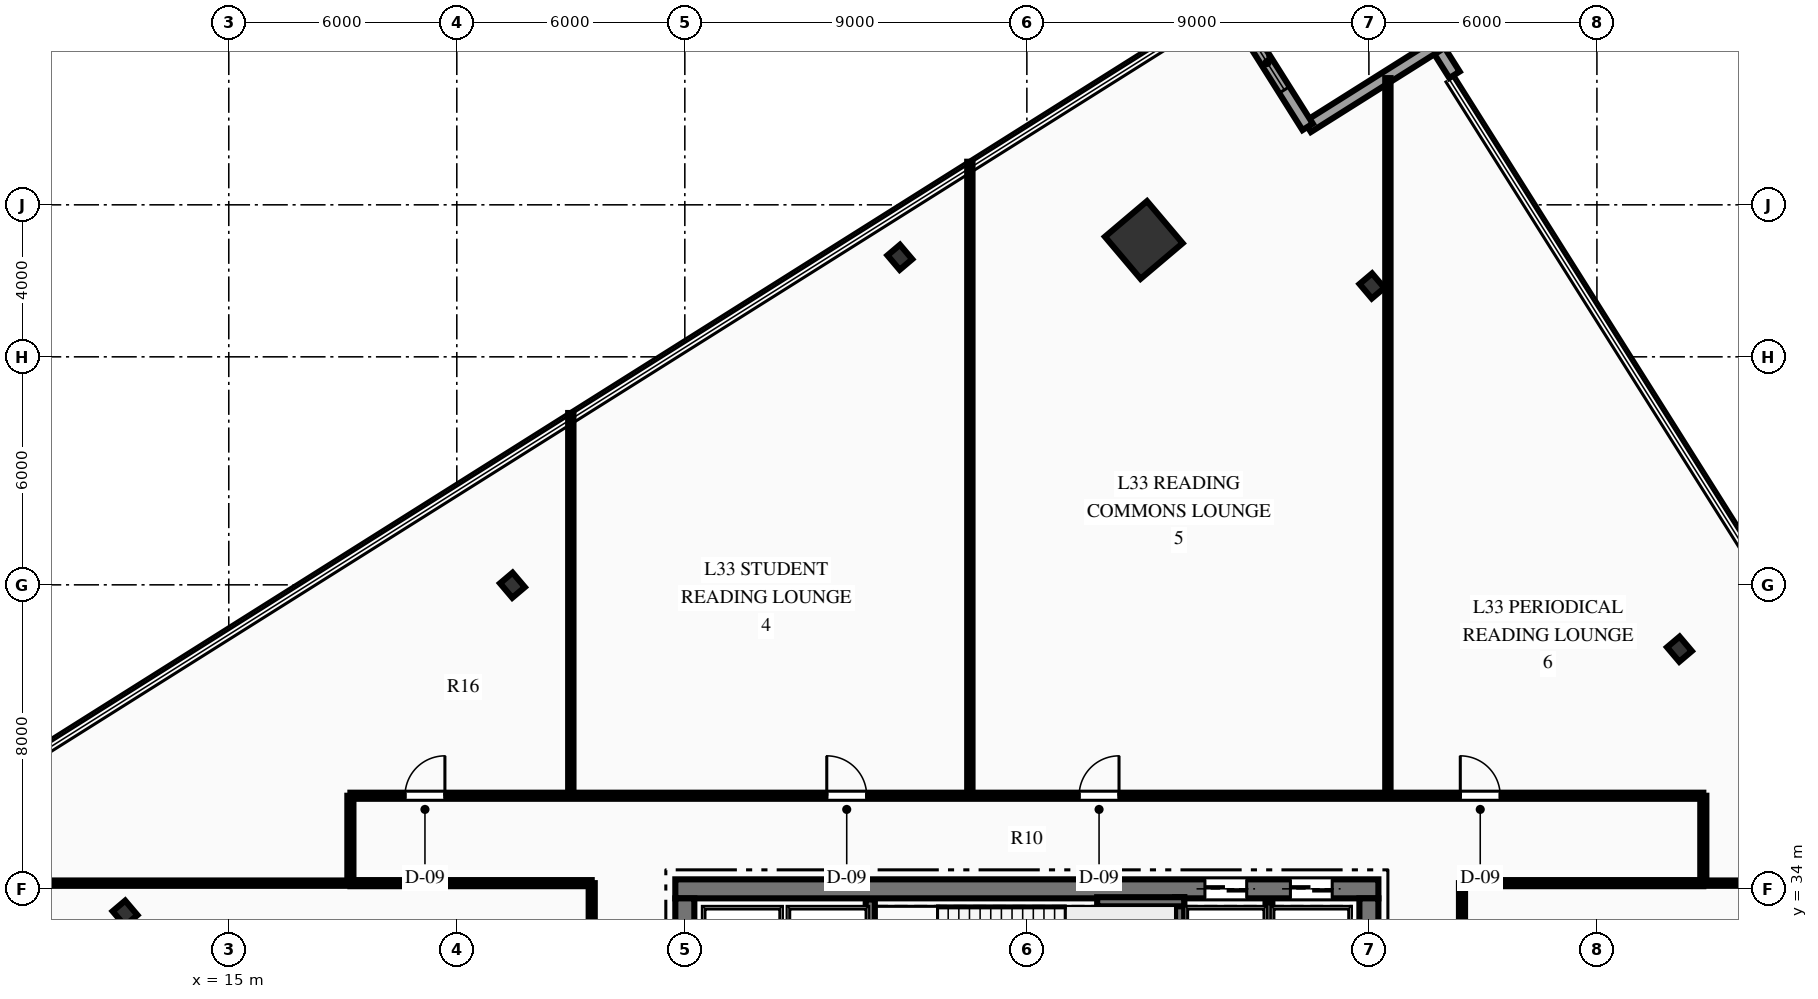
"""IFC4 building model, lengths in metres.
Left out: names, types, materials, properties, quantities, classifications, styles, units other than length and angle.
Written with IfcOpenShell. Run it as: python <this file> out.ifc"""

import sys

from ifc_helpers import new_model, si_unit, direction, frame, frame_2d, origin, origin_2d, place, context, subcontext, project, spatial, rectangle, hollow_rectangle, i_section, extrude, element, fill, save


model = new_model("IFC4")
c1 = context("Model", 3, precision=1e-05, world=origin(), true_north=direction((0.0, 1.0)))
c2 = subcontext(c1, "Body", "Model", "MODEL_VIEW")
j1 = project(units=[si_unit("LENGTHUNIT", "METRE"), si_unit("PLANEANGLEUNIT", "RADIAN")], contexts=[c1])
p1 = place(None, origin())
s1 = spatial("IfcSite", under=j1, at=p1, CompositionType="ELEMENT")
p2 = place(p1, origin())
s2 = spatial("IfcBuilding", under=s1, at=p2, CompositionType="ELEMENT")
p3 = place(p2, frame((0.0, 0.0, 136.2)))
s3 = spatial("IfcBuildingStorey", under=s2, at=p3, CompositionType="ELEMENT", Elevation=136.2)
p4 = place(p3, frame((26.75, 34.0, 0.0), z_axis=(0.0, 0.0, 1.0), x_axis=(1.0, 0.0, 0.0)))
e1 = element("IfcWall", 1, at=p4, inside=s3, PredefinedType="SHEAR", context=c2, shape_type="SweptSolid", body=[
    extrude(rectangle(XDim=18.5, YDim=0.5, at=frame_2d((9.25, 0.0))), origin(), (0.0, 0.0, 1.0), 4.5),
])
p5 = place(p4, frame((13.935, 0.0, 0.0)))
e2 = element("IfcOpeningElement", 2, at=p5, cuts=e1, PredefinedType="OPENING", context=c2, shape_type="SweptSolid", body=[
    extrude(rectangle(XDim=1.1, YDim=2.15, at=frame_2d((0.55, 1.075))), frame((0.0, 0.26, 0.0), z_axis=(0.0, -1.0, 0.0), x_axis=(1.0, 0.0, 0.0)), (0.0, 0.0, 1.0), 0.52),
])
p6 = place(p4, frame((16.185, 0.0, 0.0)))
e3 = element("IfcOpeningElement", 3, at=p6, cuts=e1, PredefinedType="OPENING", context=c2, shape_type="SweptSolid", body=[
    extrude(rectangle(XDim=1.1, YDim=2.15, at=frame_2d((0.55, 1.075))), frame((0.0, 0.26, 0.0), z_axis=(0.0, -1.0, 0.0), x_axis=(1.0, 0.0, 0.0)), (0.0, 0.0, 1.0), 0.52),
])
p7 = place(p3, frame((27.0, 18.25, 0.0), z_axis=(0.0, 0.0, 1.0), x_axis=(0.0, 1.0, 0.0)))
e4 = element("IfcWall", 4, at=p7, inside=s3, PredefinedType="SHEAR", context=c2, shape_type="SweptSolid", body=[
    extrude(rectangle(XDim=15.5, YDim=0.5, at=frame_2d((7.75, 0.0))), origin(), (0.0, 0.0, 1.0), 4.5),
])
p8 = place(p7, frame((9.99, 0.0, 0.0)))
e5 = element("IfcOpeningElement", 5, at=p8, cuts=e4, PredefinedType="OPENING", context=c2, shape_type="SweptSolid", body=[
    extrude(rectangle(XDim=1.4, YDim=2.2, at=frame_2d((0.7, 1.1))), frame((0.0, 0.26, 0.0), z_axis=(0.0, -1.0, 0.0), x_axis=(1.0, 0.0, 0.0)), (0.0, 0.0, 1.0), 0.52),
])
p9 = place(p3, frame((45.0, 18.25, 0.0), z_axis=(0.0, 0.0, 1.0), x_axis=(0.0, 1.0, 0.0)))
e6 = element("IfcWall", 6, at=p9, inside=s3, PredefinedType="SHEAR", context=c2, shape_type="SweptSolid", body=[
    extrude(rectangle(XDim=15.5, YDim=0.5, at=frame_2d((7.75, 0.0))), origin(), (0.0, 0.0, 1.0), 4.5),
])
p10 = place(p9, frame((9.99, 0.0, 0.0)))
e7 = element("IfcOpeningElement", 7, at=p10, cuts=e6, PredefinedType="OPENING", context=c2, shape_type="SweptSolid", body=[
    extrude(rectangle(XDim=1.4, YDim=2.2, at=frame_2d((0.7, 1.1))), frame((0.0, 0.26, 0.0), z_axis=(0.0, -1.0, 0.0), x_axis=(1.0, 0.0, 0.0)), (0.0, 0.0, 1.0), 0.52),
])
p11 = place(p3, frame((31.88, 29.93, 0.0), z_axis=(0.0, 0.0, 1.0), x_axis=(0.0, 1.0, 0.0)))
e8 = element("IfcWall", 8, at=p11, inside=s3, PredefinedType="SHEAR", context=c2, shape_type="SweptSolid", body=[
    extrude(rectangle(XDim=3.79, YDim=0.24, at=frame_2d((1.895, 0.0))), origin(), (0.0, 0.0, 1.0), 4.5),
])
p12 = place(p3, frame((40.02, 29.93, 0.0), z_axis=(0.0, 0.0, 1.0), x_axis=(0.0, 1.0, 0.0)))
e9 = element("IfcWall", 9, at=p12, inside=s3, PredefinedType="SHEAR", context=c2, shape_type="SweptSolid", body=[
    extrude(rectangle(XDim=3.85, YDim=0.24, at=frame_2d((1.925, 0.0))), origin(), (0.0, 0.0, 1.0), 4.5),
])
p13 = place(p3, frame((37.85, 33.66, 0.0), z_axis=(0.0, 0.0, 1.0), x_axis=(1.0, 0.0, 0.0)))
e10 = element("IfcWall", 10, at=p13, inside=s3, PredefinedType="SHEAR", context=c2, shape_type="SweptSolid", body=[
    extrude(rectangle(XDim=2.29, YDim=0.24, at=frame_2d((1.145, 0.0))), origin(), (0.0, 0.0, 1.0), 4.5),
])
p14 = place(p3, frame((39.077, 51.075, 0.0), z_axis=(0.0, 0.0, 1.0), x_axis=(0.763232469783, 0.646123979643, 0.0)))
e11 = element("IfcColumn", 11, at=p14, inside=s3, PredefinedType="COLUMN", context=c2, shape_type="SweptSolid", body=[
    extrude(hollow_rectangle(XDim=1.45, YDim=1.45, WallThickness=0.07, at=origin_2d()), origin(), (0.0, 0.0, 1.0), 4.5),
])
for number, where, z_axis, x_axis in (
    (12, (53.171, 40.307, 0.0), (0.0, 0.0, 1.0), (0.763, 0.646, 0.0)),
    (13, (45.08, 49.865, 0.0), (0.0, 0.0, 1.0), (0.763, 0.646, 0.0)),
    (14, (32.657, 50.619, 0.0), (0.0, 0.0, 1.0), (0.763, 0.646, 0.0)),
    (15, (22.464, 41.99, 0.0), (0.0, 0.0, 1.0), (0.763, 0.646, 0.0)),
    (16, (12.27, 33.36, 0.0), (0.0, 0.0, 1.0), (0.763, 0.646, 0.0)),
):
    element("IfcColumn", number, at=place(p3, frame(where, z_axis=z_axis, x_axis=x_axis)), inside=s3, PredefinedType="COLUMN", context=c2, shape_type="SweptSolid", body=[
        extrude(i_section(OverallWidth=0.432, OverallDepth=0.498, WebThickness=0.056, FlangeThickness=0.089, at=origin_2d()), origin(), (0.0, 0.0, 1.0), 4.5),
    ])
p15 = place(p3, frame((46.773, 56.183, 0.0), z_axis=(0.0, 0.0, 1.0), x_axis=(0.532726937179, -0.846287191445, 0.0)))
e17 = element("IfcWall", 17, at=p15, inside=s3, PredefinedType="STANDARD", context=c2, shape_type="SweptSolid", body=[
    extrude(rectangle(XDim=0.9, YDim=0.32, at=frame_2d((0.45, 0.0))), origin(), (0.0, 0.0, 1.0), 4.21),
])
p16 = place(p3, frame((43.388, 54.052, 0.0), z_axis=(0.0, 0.0, 1.0), x_axis=(0.846200224481, 0.532865067432, 0.0)))
e18 = element("IfcWall", 18, at=p16, inside=s3, PredefinedType="STANDARD", context=c2, shape_type="SweptSolid", body=[
    extrude(rectangle(XDim=4.0, YDim=0.32, at=frame_2d((2.0, 0.0))), origin(), (0.0, 0.0, 1.0), 4.21),
])
p17 = place(p3, frame((41.257, 57.436, 0.0), z_axis=(0.0, 0.0, 1.0), x_axis=(0.532848883848, -0.846210415312, 0.0)))
e19 = element("IfcWall", 19, at=p17, inside=s3, PredefinedType="STANDARD", context=c2, shape_type="SweptSolid", body=[
    extrude(rectangle(XDim=4.0, YDim=0.32, at=frame_2d((2.0, 0.0))), origin(), (0.0, 0.0, 1.0), 4.21),
])
p18 = place(p17, frame((1.15, 0.0, 0.75)))
e20 = element("IfcOpeningElement", 20, at=p18, cuts=e19, PredefinedType="OPENING", context=c2, shape_type="SweptSolid", body=[
    extrude(rectangle(XDim=1.7, YDim=2.5, at=frame_2d((0.85, 1.25))), frame((0.0, 0.17, 0.0), z_axis=(0.0, -1.0, 0.0), x_axis=(1.0, 0.0, 0.0)), (0.0, 0.0, 1.0), 0.34),
])
p19 = place(p3, frame((42.37, 29.9, 0.0), z_axis=(0.0, 0.0, 1.0), x_axis=(0.0, 1.0, 0.0)))
e21 = element("IfcWall", 21, at=p19, inside=s3, PredefinedType="PARTITIONING", context=c2, shape_type="SweptSolid", body=[
    extrude(rectangle(XDim=3.75, YDim=0.18, at=frame_2d((1.875, 0.0))), origin(), (0.0, 0.0, 1.0), 4.21),
])
p20 = place(p3, frame((18.2, 36.45, 0.0), z_axis=(0.0, 0.0, 1.0), x_axis=(1.0, 0.0, 0.0)))
e22 = element("IfcWall", 22, at=p20, inside=s3, PredefinedType="PARTITIONING", context=c2, shape_type="SweptSolid", body=[
    extrude(rectangle(XDim=35.6, YDim=0.16, at=frame_2d((17.8, 0.0))), origin(), (0.0, 0.0, 1.0), 4.21),
])
p21 = place(p20, frame((1.437, 0.0, 0.0)))
e23 = element("IfcOpeningElement", 23, at=p21, cuts=e22, PredefinedType="OPENING", context=c2, shape_type="SweptSolid", body=[
    extrude(rectangle(XDim=1.05, YDim=2.15, at=frame_2d((0.525, 1.075))), frame((0.0, 0.09, 0.0), z_axis=(0.0, -1.0, 0.0), x_axis=(1.0, 0.0, 0.0)), (0.0, 0.0, 1.0), 0.18),
])
p22 = place(p20, frame((12.535, 0.0, 0.0)))
e24 = element("IfcOpeningElement", 24, at=p22, cuts=e22, PredefinedType="OPENING", context=c2, shape_type="SweptSolid", body=[
    extrude(rectangle(XDim=1.05, YDim=2.15, at=frame_2d((0.525, 1.075))), frame((0.0, 0.09, 0.0), z_axis=(0.0, -1.0, 0.0), x_axis=(1.0, 0.0, 0.0)), (0.0, 0.0, 1.0), 0.18),
])
p23 = place(p20, frame((19.175, 0.0, 0.0)))
e25 = element("IfcOpeningElement", 25, at=p23, cuts=e22, PredefinedType="OPENING", context=c2, shape_type="SweptSolid", body=[
    extrude(rectangle(XDim=1.05, YDim=2.15, at=frame_2d((0.525, 1.075))), frame((0.0, 0.09, 0.0), z_axis=(0.0, -1.0, 0.0), x_axis=(1.0, 0.0, 0.0)), (0.0, 0.0, 1.0), 0.18),
])
p24 = place(p20, frame((29.205, 0.0, 0.0)))
e26 = element("IfcOpeningElement", 26, at=p24, cuts=e22, PredefinedType="OPENING", context=c2, shape_type="SweptSolid", body=[
    extrude(rectangle(XDim=1.05, YDim=2.15, at=frame_2d((0.525, 1.075))), frame((0.0, 0.09, 0.0), z_axis=(0.0, -1.0, 0.0), x_axis=(1.0, 0.0, 0.0)), (0.0, 0.0, 1.0), 0.18),
])
for number, where, z_axis, x_axis in (
    (27, (18.2, 34.15, 0.0), (0.0, 0.0, 1.0), (1.0, 0.0, 0.0)),
    (28, (47.45, 34.15, 0.0), (0.0, 0.0, 1.0), (1.0, 0.0, 0.0)),
):
    element("IfcWall", number, at=place(p3, frame(where, z_axis=z_axis, x_axis=x_axis)), inside=s3, PredefinedType="PARTITIONING", context=c2, shape_type="SweptSolid", body=[
        extrude(rectangle(XDim=6.35, YDim=0.16, at=frame_2d((3.175, 0.0))), origin(), (0.0, 0.0, 1.0), 4.21),
    ])
p25 = place(p3, frame((24.55, 17.85, 0.0), z_axis=(0.0, 0.0, 1.0), x_axis=(0.0, 1.0, 0.0)))
e29 = element("IfcWall", 29, at=p25, inside=s3, PredefinedType="PARTITIONING", context=c2, shape_type="SweptSolid", body=[
    extrude(rectangle(XDim=16.3, YDim=0.16, at=frame_2d((8.15, 0.0))), origin(), (0.0, 0.0, 1.0), 4.21),
])
p26 = place(p25, frame((7.967, 0.0, 0.0)))
e30 = element("IfcOpeningElement", 30, at=p26, cuts=e29, PredefinedType="OPENING", context=c2, shape_type="SweptSolid", body=[
    extrude(rectangle(XDim=1.05, YDim=2.15, at=frame_2d((0.525, 1.075))), frame((0.0, 0.09, 0.0), z_axis=(0.0, -1.0, 0.0), x_axis=(1.0, 0.0, 0.0)), (0.0, 0.0, 1.0), 0.18),
])
p27 = place(p3, frame((47.45, 27.25, 0.0), z_axis=(0.0, 0.0, 1.0), x_axis=(0.0, 1.0, 0.0)))
e31 = element("IfcWall", 31, at=p27, inside=s3, PredefinedType="PARTITIONING", context=c2, shape_type="SweptSolid", body=[
    extrude(rectangle(XDim=6.9, YDim=0.16, at=frame_2d((3.45, 0.0))), origin(), (0.0, 0.0, 1.0), 4.21),
])
p28 = place(p27, frame((1.683, 0.0, 0.0)))
e32 = element("IfcOpeningElement", 32, at=p28, cuts=e31, PredefinedType="OPENING", context=c2, shape_type="SweptSolid", body=[
    extrude(rectangle(XDim=1.05, YDim=2.15, at=frame_2d((0.525, 1.075))), frame((0.0, 0.09, 0.0), z_axis=(0.0, -1.0, 0.0), x_axis=(1.0, 0.0, 0.0)), (0.0, 0.0, 1.0), 0.18),
])
for number, where, z_axis, x_axis in (
    (33, (18.2, 34.15, 0.0), (0.0, 0.0, 1.0), (0.0, 1.0, 0.0)),
    (34, (53.8, 34.15, 0.0), (0.0, 0.0, 1.0), (0.0, 1.0, 0.0)),
):
    element("IfcWall", number, at=place(p3, frame(where, z_axis=z_axis, x_axis=x_axis)), inside=s3, PredefinedType="PARTITIONING", context=c2, shape_type="SweptSolid", body=[
        extrude(rectangle(XDim=2.3, YDim=0.16, at=frame_2d((1.15, 0.0))), origin(), (0.0, 0.0, 1.0), 4.21),
    ])
p29 = place(p3, frame((5.862, 34.15, 0.0), z_axis=(0.0, 0.0, 1.0), x_axis=(1.0, 0.0, 0.0)))
e35 = element("IfcWall", 35, at=p29, inside=s3, PredefinedType="PARTITIONING", context=c2, shape_type="SweptSolid", body=[
    extrude(rectangle(XDim=12.338, YDim=0.14, at=frame_2d((6.169, 0.0))), origin(), (0.0, 0.0, 1.0), 4.21),
])
p30 = place(p3, frame((53.8, 34.15, 0.0), z_axis=(0.0, 0.0, 1.0), x_axis=(1.0, 0.0, 0.0)))
e36 = element("IfcWall", 36, at=p30, inside=s3, PredefinedType="PARTITIONING", context=c2, shape_type="SweptSolid", body=[
    extrude(rectangle(XDim=6.801, YDim=0.14, at=frame_2d((3.4, 0.0))), origin(), (0.0, 0.0, 1.0), 4.21),
])
p31 = place(p3, frame((24.0, 36.45, 0.0), z_axis=(0.0, 0.0, 1.0), x_axis=(0.0, 1.0, 0.0)))
e37 = element("IfcWall", 37, at=p31, inside=s3, PredefinedType="PARTITIONING", context=c2, shape_type="SweptSolid", body=[
    extrude(rectangle(XDim=10.072, YDim=0.14, at=frame_2d((5.036, 0.0))), origin(), (0.0, 0.0, 1.0), 4.21),
])
p32 = place(p3, frame((34.5, 36.45, 0.0), z_axis=(0.0, 0.0, 1.0), x_axis=(0.0, 1.0, 0.0)))
e38 = element("IfcWall", 38, at=p32, inside=s3, PredefinedType="PARTITIONING", context=c2, shape_type="SweptSolid", body=[
    extrude(rectangle(XDim=16.684, YDim=0.14, at=frame_2d((8.342, 0.0))), origin(), (0.0, 0.0, 1.0), 4.21),
])
p33 = place(p3, frame((45.5, 36.45, 0.0), z_axis=(0.0, 0.0, 1.0), x_axis=(0.0, 1.0, 0.0)))
e39 = element("IfcWall", 39, at=p33, inside=s3, PredefinedType="PARTITIONING", context=c2, shape_type="SweptSolid", body=[
    extrude(rectangle(XDim=18.884, YDim=0.14, at=frame_2d((9.442, 0.0))), origin(), (0.0, 0.0, 1.0), 4.21),
])
p34 = place(p18, origin())
e40 = element("IfcWindow", 40, at=p34, inside=s3, PartitioningType="SINGLE_PANEL", PredefinedType="WINDOW", context=c2, shape_type="SweptSolid", body=[
    extrude(rectangle(XDim=1.7, YDim=2.5, at=frame_2d((0.85, 1.25))), frame((0.0, 0.03, 0.0), z_axis=(0.0, -1.0, 0.0), x_axis=(1.0, 0.0, 0.0)), (0.0, 0.0, 1.0), 0.06),
])
fill(e20, e40)
p35 = place(p21, origin())
e41 = element("IfcDoor", 41, at=p35, inside=s3, OperationType="SINGLE_SWING_RIGHT", PredefinedType="DOOR", context=c2, shape_type="SweptSolid", body=[
    extrude(rectangle(XDim=1.05, YDim=2.15, at=frame_2d((0.525, 1.075))), frame((0.0, 0.025, 0.0), z_axis=(0.0, -1.0, 0.0), x_axis=(1.0, 0.0, 0.0)), (0.0, 0.0, 1.0), 0.05),
])
fill(e23, e41)
p36 = place(p22, origin())
e42 = element("IfcDoor", 42, at=p36, inside=s3, OperationType="SINGLE_SWING_LEFT", PredefinedType="DOOR", context=c2, shape_type="SweptSolid", body=[
    extrude(rectangle(XDim=1.05, YDim=2.15, at=frame_2d((0.525, 1.075))), frame((0.0, 0.025, 0.0), z_axis=(0.0, -1.0, 0.0), x_axis=(1.0, 0.0, 0.0)), (0.0, 0.0, 1.0), 0.05),
])
fill(e24, e42)
p37 = place(p23, origin())
e43 = element("IfcDoor", 43, at=p37, inside=s3, OperationType="SINGLE_SWING_RIGHT", PredefinedType="DOOR", context=c2, shape_type="SweptSolid", body=[
    extrude(rectangle(XDim=1.05, YDim=2.15, at=frame_2d((0.525, 1.075))), frame((0.0, 0.025, 0.0), z_axis=(0.0, -1.0, 0.0), x_axis=(1.0, 0.0, 0.0)), (0.0, 0.0, 1.0), 0.05),
])
fill(e25, e43)
p38 = place(p24, origin())
e44 = element("IfcDoor", 44, at=p38, inside=s3, OperationType="SINGLE_SWING_LEFT", PredefinedType="DOOR", context=c2, shape_type="SweptSolid", body=[
    extrude(rectangle(XDim=1.05, YDim=2.15, at=frame_2d((0.525, 1.075))), frame((0.0, 0.025, 0.0), z_axis=(0.0, -1.0, 0.0), x_axis=(1.0, 0.0, 0.0)), (0.0, 0.0, 1.0), 0.05),
])
fill(e26, e44)
p39 = place(p5, origin())
e45 = element("IfcDoor", 45, at=p39, inside=s3, OperationType="SLIDING_TO_LEFT", PredefinedType="DOOR", context=c2, shape_type="SweptSolid", body=[
    extrude(rectangle(XDim=1.1, YDim=2.15, at=frame_2d((0.55, 1.075))), frame((0.0, 0.025, 0.0), z_axis=(0.0, -1.0, 0.0), x_axis=(1.0, 0.0, 0.0)), (0.0, 0.0, 1.0), 0.05),
])
fill(e2, e45)
p40 = place(p6, origin())
e46 = element("IfcDoor", 46, at=p40, inside=s3, OperationType="SLIDING_TO_LEFT", PredefinedType="DOOR", context=c2, shape_type="SweptSolid", body=[
    extrude(rectangle(XDim=1.1, YDim=2.15, at=frame_2d((0.55, 1.075))), frame((0.0, 0.025, 0.0), z_axis=(0.0, -1.0, 0.0), x_axis=(1.0, 0.0, 0.0)), (0.0, 0.0, 1.0), 0.05),
])
fill(e3, e46)
save(model, sys.argv[1])
